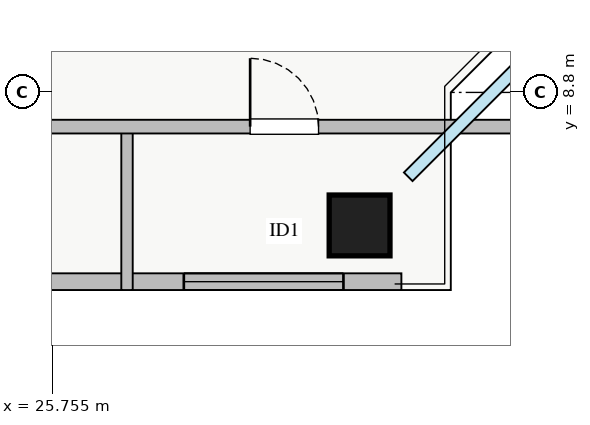
"""IFC4 building model, lengths in metres.
Left out: names, types, materials, properties, quantities, classifications, styles, units other than length and angle.
Written with IfcOpenShell. Run it as: python <this file> out.ifc"""

import sys

from ifc_helpers import new_model, si_unit, direction, frame, frame_2d, origin, origin_2d, place, context, subcontext, project, spatial, rectangle, extrude, source, transform, mapped, element, fill, save


model = new_model("IFC4")
c1 = context("Model", 3, precision=1e-05, world=origin(), true_north=direction((0.0, 1.0)))
c2 = subcontext(c1, "Body", "Model", "MODEL_VIEW")
j1 = project(units=[si_unit("LENGTHUNIT", "METRE"), si_unit("PLANEANGLEUNIT", "RADIAN")], contexts=[c1])
p1 = place(None, origin())
s1 = spatial("IfcSite", under=j1, at=p1, CompositionType="ELEMENT")
p2 = place(p1, origin())
s2 = spatial("IfcBuilding", under=s1, at=p2, CompositionType="ELEMENT")
p3 = place(p2, frame((0.0, 0.0, 216.5)))
s3 = spatial("IfcBuildingStorey", under=s2, at=p3, CompositionType="ELEMENT", Elevation=216.5)
m1 = source(origin(), c2, "Body", "SweptSolid", [
    extrude(rectangle(XDim=0.8, YDim=0.8, at=origin_2d()), origin(), (0.0, 0.0, 1.0), 3.25),
])
p4 = place(p3, frame((29.8, 7.05, 0.0), z_axis=(0.0, 0.0, 1.0), x_axis=(1.0, 0.0, 0.0)))
e1 = element("IfcColumn", 1, at=p4, inside=s3, PredefinedType="COLUMN", context=c2, shape_type="MappedRepresentation", body=[
    mapped(m1, transform((0.0, 0.0, 0.0), x_axis=(1.0, 0.0, 0.0), y_axis=(0.0, 1.0, 0.0), z_axis=(0.0, 0.0, 1.0), scale=1.0)),
])
p5 = place(p3, frame((7.65, 6.31, 0.0), z_axis=(0.0, 0.0, 1.0), x_axis=(1.0, 0.0, 0.0)))
e2 = element("IfcWall", 2, at=p5, inside=s3, PredefinedType="STANDARD", context=c2, shape_type="SweptSolid", body=[
    extrude(rectangle(XDim=22.7, YDim=0.22, at=frame_2d((11.35, 0.0))), origin(), (0.0, 0.0, 1.0), 2.61),
])
p6 = place(p5, frame((12.2, 0.0, 0.0)))
e3 = element("IfcOpeningElement", 3, at=p6, cuts=e2, PredefinedType="OPENING", context=c2, shape_type="SweptSolid", body=[
    extrude(rectangle(XDim=1.2, YDim=2.1, at=frame_2d((0.6, 1.05))), frame((0.0, 0.12, 0.0), z_axis=(0.0, -1.0, 0.0), x_axis=(1.0, 0.0, 0.0)), (0.0, 0.0, 1.0), 0.24),
])
p7 = place(p5, frame((1.637, 0.0, 0.9)))
e4 = element("IfcOpeningElement", 4, at=p7, cuts=e2, PredefinedType="OPENING", context=c2, shape_type="SweptSolid", body=[
    extrude(rectangle(XDim=2.4, YDim=1.48, at=frame_2d((1.2, 0.74))), frame((0.0, 0.12, 0.0), z_axis=(0.0, -1.0, 0.0), x_axis=(1.0, 0.0, 0.0)), (0.0, 0.0, 1.0), 0.24),
])
p8 = place(p5, frame((7.612, 0.0, 0.9)))
e5 = element("IfcOpeningElement", 5, at=p8, cuts=e2, PredefinedType="OPENING", context=c2, shape_type="SweptSolid", body=[
    extrude(rectangle(XDim=1.8, YDim=1.45, at=frame_2d((0.9, 0.725))), frame((0.0, 0.12, 0.0), z_axis=(0.0, -1.0, 0.0), x_axis=(1.0, 0.0, 0.0)), (0.0, 0.0, 1.0), 0.24),
])
p9 = place(p5, frame((19.837, 0.0, 0.9)))
e6 = element("IfcOpeningElement", 6, at=p9, cuts=e2, PredefinedType="OPENING", context=c2, shape_type="SweptSolid", body=[
    extrude(rectangle(XDim=2.1, YDim=1.5, at=frame_2d((1.05, 0.75))), frame((0.0, 0.12, 0.0), z_axis=(0.0, -1.0, 0.0), x_axis=(1.0, 0.0, 0.0)), (0.0, 0.0, 1.0), 0.24),
])
p10 = place(p3, frame((26.74, 6.2, 0.0), z_axis=(0.0, 0.0, 1.0), x_axis=(0.0, 1.0, 0.0)))
e7 = element("IfcWall", 7, at=p10, inside=s3, PredefinedType="PARTITIONING", context=c2, shape_type="SweptSolid", body=[
    extrude(rectangle(XDim=2.15, YDim=0.15, at=frame_2d((1.075, 0.0))), origin(), (0.0, 0.0, 1.0), 3.07),
])
p11 = place(p3, frame((22.6, 8.35, 0.0), z_axis=(0.0, 0.0, 1.0), x_axis=(1.0, 0.0, 0.0)))
e8 = element("IfcWall", 8, at=p11, inside=s3, PredefinedType="PARTITIONING", context=c2, shape_type="SweptSolid", body=[
    extrude(rectangle(XDim=9.85, YDim=0.18, at=frame_2d((4.925, 0.0))), origin(), (0.0, 0.0, 1.0), 3.07),
])
p12 = place(p11, frame((1.62, 0.0, 0.0)))
e9 = element("IfcOpeningElement", 9, at=p12, cuts=e8, PredefinedType="OPENING", context=c2, shape_type="SweptSolid", body=[
    extrude(rectangle(XDim=0.9, YDim=2.05, at=frame_2d((0.45, 1.025))), frame((0.0, 0.1, 0.0), z_axis=(0.0, -1.0, 0.0), x_axis=(1.0, 0.0, 0.0)), (0.0, 0.0, 1.0), 0.2),
])
p13 = place(p11, frame((5.76, 0.0, 0.0)))
e10 = element("IfcOpeningElement", 10, at=p13, cuts=e8, PredefinedType="OPENING", context=c2, shape_type="SweptSolid", body=[
    extrude(rectangle(XDim=0.9, YDim=2.05, at=frame_2d((0.45, 1.025))), frame((0.0, 0.1, 0.0), z_axis=(0.0, -1.0, 0.0), x_axis=(1.0, 0.0, 0.0)), (0.0, 0.0, 1.0), 0.2),
])
m2 = source(origin(), c2, "Body", "SweptSolid", [
    extrude(rectangle(XDim=2.1, YDim=1.5, at=frame_2d((1.05, 0.75))), frame((0.0, 0.03, 0.0), z_axis=(0.0, -1.0, 0.0), x_axis=(1.0, 0.0, 0.0)), (0.0, 0.0, 1.0), 0.06),
])
p14 = place(p9, origin())
e11 = element("IfcWindow", 11, at=p14, inside=s3, PartitioningType="TRIPLE_PANEL_VERTICAL", PredefinedType="WINDOW", context=c2, shape_type="MappedRepresentation", body=[
    mapped(m2, transform((0.0, 0.0, 0.0), x_axis=(1.0, 0.0, 0.0), y_axis=(0.0, 1.0, 0.0), z_axis=(0.0, 0.0, 1.0), scale=1.0)),
])
fill(e6, e11)
m3 = source(origin(), c2, "Body", "SweptSolid", [
    extrude(rectangle(XDim=0.9, YDim=2.05, at=frame_2d((0.45, 1.025))), frame((0.0, 0.025, 0.0), z_axis=(0.0, -1.0, 0.0), x_axis=(1.0, 0.0, 0.0)), (0.0, 0.0, 1.0), 0.05),
])
p15 = place(p13, origin())
e12 = element("IfcDoor", 12, at=p15, inside=s3, OperationType="SINGLE_SWING_LEFT", PredefinedType="DOOR", context=c2, shape_type="MappedRepresentation", body=[
    mapped(m3, transform((0.0, 0.0, 0.0), x_axis=(1.0, 0.0, 0.0), y_axis=(0.0, 1.0, 0.0), z_axis=(0.0, 0.0, 1.0), scale=1.0)),
])
fill(e10, e12)
save(model, sys.argv[1])
